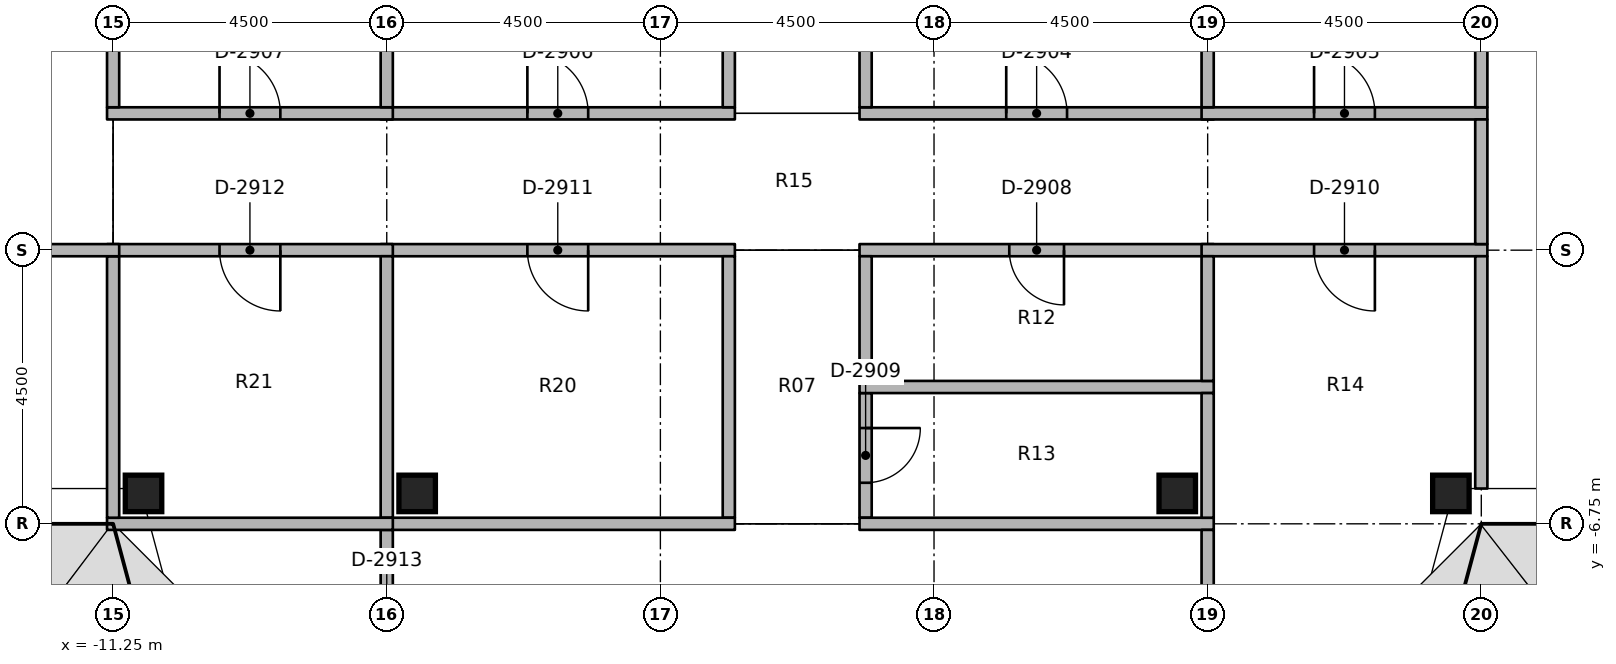
"""IFC4 building model, lengths in metres.
Left out: names, types, materials, properties, quantities, classifications, styles, units other than length and angle.
Written with IfcOpenShell. Run it as: python <this file> out.ifc"""

import sys

from ifc_helpers import new_model, si_unit, direction, frame, frame_2d, origin, origin_2d, place, context, subcontext, project, spatial, rectangle, extrude, element, fill, save


model = new_model("IFC4")
c1 = context("Model", 3, precision=1e-05, world=origin(), true_north=direction((0.0, 1.0)))
c2 = subcontext(c1, "Body", "Model", "MODEL_VIEW")
j1 = project(units=[si_unit("LENGTHUNIT", "METRE"), si_unit("PLANEANGLEUNIT", "RADIAN")], contexts=[c1])
p1 = place(None, origin())
s1 = spatial("IfcSite", under=j1, at=p1, CompositionType="ELEMENT")
p2 = place(p1, origin())
s2 = spatial("IfcBuilding", under=s1, at=p2, CompositionType="ELEMENT")
p3 = place(p2, frame((0.0, 0.0, 276.4)))
s3 = spatial("IfcBuildingStorey", under=s2, at=p3, CompositionType="ELEMENT", Elevation=276.4)
for number, where, z_axis, x_axis in (
    (1, (-10.75, -6.25, 0.0), (0.0, 0.0, 1.0), (1.0, 0.0, 0.0)),
    (2, (-6.25, -6.25, 0.0), (0.0, 0.0, 1.0), (1.0, 0.0, 0.0)),
    (3, (6.25, -6.25, 0.0), (0.0, 0.0, 1.0), (1.0, 0.0, 0.0)),
    (4, (10.75, -6.25, 0.0), (0.0, 0.0, 1.0), (1.0, 0.0, 0.0)),
):
    element("IfcColumn", number, at=place(p3, frame(where, z_axis=z_axis, x_axis=x_axis)), inside=s3, PredefinedType="COLUMN", context=c2, shape_type="SweptSolid", body=[
        extrude(rectangle(XDim=0.6, YDim=0.6, at=origin_2d()), origin(), (0.0, 0.0, 1.0), 3.65),
    ])
p4 = place(p3, frame((1.025, 0.0, 0.0), z_axis=(0.0, 0.0, 1.0), x_axis=(1.0, 0.0, 0.0)))
e5 = element("IfcWall", 5, at=p4, inside=s3, PredefinedType="PARTITIONING", context=c2, shape_type="SweptSolid", body=[
    extrude(rectangle(XDim=5.825, YDim=0.2, at=frame_2d((2.913, 0.0))), origin(), (0.0, 0.0, 1.0), 2.75),
])
p5 = place(p4, frame((2.413, 0.0, 0.0)))
e6 = element("IfcOpeningElement", 6, at=p5, cuts=e5, PredefinedType="OPENING", context=c2, shape_type="SweptSolid", body=[
    extrude(rectangle(XDim=1.0, YDim=2.1, at=frame_2d((0.5, 1.05))), frame((0.0, 0.11, 0.0), z_axis=(0.0, -1.0, 0.0), x_axis=(1.0, 0.0, 0.0)), (0.0, 0.0, 1.0), 0.22),
])
p6 = place(p3, frame((6.65, 0.0, 0.0), z_axis=(0.0, 0.0, 1.0), x_axis=(1.0, 0.0, 0.0)))
e7 = element("IfcWall", 7, at=p6, inside=s3, PredefinedType="PARTITIONING", context=c2, shape_type="SweptSolid", body=[
    extrude(rectangle(XDim=4.7, YDim=0.2, at=frame_2d((2.35, 0.0))), origin(), (0.0, 0.0, 1.0), 2.75),
])
p7 = place(p6, frame((1.85, 0.0, 0.0)))
e8 = element("IfcOpeningElement", 8, at=p7, cuts=e7, PredefinedType="OPENING", context=c2, shape_type="SweptSolid", body=[
    extrude(rectangle(XDim=1.0, YDim=2.1, at=frame_2d((0.5, 1.05))), frame((0.0, 0.11, 0.0), z_axis=(0.0, -1.0, 0.0), x_axis=(1.0, 0.0, 0.0)), (0.0, 0.0, 1.0), 0.22),
])
p8 = place(p3, frame((-6.85, 0.0, 0.0), z_axis=(0.0, 0.0, 1.0), x_axis=(1.0, 0.0, 0.0)))
e9 = element("IfcWall", 9, at=p8, inside=s3, PredefinedType="PARTITIONING", context=c2, shape_type="SweptSolid", body=[
    extrude(rectangle(XDim=5.825, YDim=0.2, at=frame_2d((2.913, 0.0))), origin(), (0.0, 0.0, 1.0), 2.75),
])
p9 = place(p8, frame((2.413, 0.0, 0.0)))
e10 = element("IfcOpeningElement", 10, at=p9, cuts=e9, PredefinedType="OPENING", context=c2, shape_type="SweptSolid", body=[
    extrude(rectangle(XDim=1.0, YDim=2.1, at=frame_2d((0.5, 1.05))), frame((0.0, 0.11, 0.0), z_axis=(0.0, -1.0, 0.0), x_axis=(1.0, 0.0, 0.0)), (0.0, 0.0, 1.0), 0.22),
])
p10 = place(p3, frame((-11.35, 0.0, 0.0), z_axis=(0.0, 0.0, 1.0), x_axis=(1.0, 0.0, 0.0)))
e11 = element("IfcWall", 11, at=p10, inside=s3, PredefinedType="PARTITIONING", context=c2, shape_type="SweptSolid", body=[
    extrude(rectangle(XDim=4.7, YDim=0.2, at=frame_2d((2.35, 0.0))), origin(), (0.0, 0.0, 1.0), 2.75),
])
p11 = place(p10, frame((1.85, 0.0, 0.0)))
e12 = element("IfcOpeningElement", 12, at=p11, cuts=e11, PredefinedType="OPENING", context=c2, shape_type="SweptSolid", body=[
    extrude(rectangle(XDim=1.0, YDim=2.1, at=frame_2d((0.5, 1.05))), frame((0.0, 0.11, 0.0), z_axis=(0.0, -1.0, 0.0), x_axis=(1.0, 0.0, 0.0)), (0.0, 0.0, 1.0), 0.22),
])
p12 = place(p3, frame((6.85, -2.25, 0.0), z_axis=(0.0, 0.0, 1.0), x_axis=(-1.0, 0.0, 0.0)))
e13 = element("IfcWall", 13, at=p12, inside=s3, PredefinedType="PARTITIONING", context=c2, shape_type="SweptSolid", body=[
    extrude(rectangle(XDim=5.825, YDim=0.2, at=frame_2d((2.913, 0.0))), origin(), (0.0, 0.0, 1.0), 2.75),
])
p13 = place(p12, frame((2.462, 0.0, 0.0)))
e14 = element("IfcOpeningElement", 14, at=p13, cuts=e13, PredefinedType="OPENING", context=c2, shape_type="SweptSolid", body=[
    extrude(rectangle(XDim=0.9, YDim=2.1, at=frame_2d((0.45, 1.05))), frame((0.0, 0.11, 0.0), z_axis=(0.0, -1.0, 0.0), x_axis=(1.0, 0.0, 0.0)), (0.0, 0.0, 1.0), 0.22),
])
p14 = place(p3, frame((11.35, -2.25, 0.0), z_axis=(0.0, 0.0, 1.0), x_axis=(-1.0, 0.0, 0.0)))
e15 = element("IfcWall", 15, at=p14, inside=s3, PredefinedType="PARTITIONING", context=c2, shape_type="SweptSolid", body=[
    extrude(rectangle(XDim=4.7, YDim=0.2, at=frame_2d((2.35, 0.0))), origin(), (0.0, 0.0, 1.0), 2.75),
])
p15 = place(p14, frame((1.85, 0.0, 0.0)))
e16 = element("IfcOpeningElement", 16, at=p15, cuts=e15, PredefinedType="OPENING", context=c2, shape_type="SweptSolid", body=[
    extrude(rectangle(XDim=1.0, YDim=2.1, at=frame_2d((0.5, 1.05))), frame((0.0, 0.11, 0.0), z_axis=(0.0, -1.0, 0.0), x_axis=(1.0, 0.0, 0.0)), (0.0, 0.0, 1.0), 0.22),
])
p16 = place(p3, frame((-1.025, -2.25, 0.0), z_axis=(0.0, 0.0, 1.0), x_axis=(-1.0, 0.0, 0.0)))
e17 = element("IfcWall", 17, at=p16, inside=s3, PredefinedType="PARTITIONING", context=c2, shape_type="SweptSolid", body=[
    extrude(rectangle(XDim=5.825, YDim=0.2, at=frame_2d((2.913, 0.0))), origin(), (0.0, 0.0, 1.0), 2.75),
])
p17 = place(p16, frame((2.413, 0.0, 0.0)))
e18 = element("IfcOpeningElement", 18, at=p17, cuts=e17, PredefinedType="OPENING", context=c2, shape_type="SweptSolid", body=[
    extrude(rectangle(XDim=1.0, YDim=2.1, at=frame_2d((0.5, 1.05))), frame((0.0, 0.11, 0.0), z_axis=(0.0, -1.0, 0.0), x_axis=(1.0, 0.0, 0.0)), (0.0, 0.0, 1.0), 0.22),
])
p18 = place(p3, frame((-6.65, -2.25, 0.0), z_axis=(0.0, 0.0, 1.0), x_axis=(-1.0, 0.0, 0.0)))
e19 = element("IfcWall", 19, at=p18, inside=s3, PredefinedType="PARTITIONING", context=c2, shape_type="SweptSolid", body=[
    extrude(rectangle(XDim=4.7, YDim=0.2, at=frame_2d((2.35, 0.0))), origin(), (0.0, 0.0, 1.0), 2.75),
])
p19 = place(p18, frame((1.85, 0.0, 0.0)))
e20 = element("IfcOpeningElement", 20, at=p19, cuts=e19, PredefinedType="OPENING", context=c2, shape_type="SweptSolid", body=[
    extrude(rectangle(XDim=1.0, YDim=2.1, at=frame_2d((0.5, 1.05))), frame((0.0, 0.11, 0.0), z_axis=(0.0, -1.0, 0.0), x_axis=(1.0, 0.0, 0.0)), (0.0, 0.0, 1.0), 0.22),
])
p20 = place(p3, frame((11.25, -2.15, 0.0), z_axis=(0.0, 0.0, 1.0), x_axis=(0.0, 1.0, 0.0)))
e21 = element("IfcWall", 21, at=p20, inside=s3, PredefinedType="PARTITIONING", context=c2, shape_type="SweptSolid", body=[
    extrude(rectangle(XDim=2.05, YDim=0.2, at=frame_2d((1.025, 0.0))), origin(), (0.0, 0.0, 1.0), 2.75),
])
for number, where, z_axis, x_axis in (
    (22, (1.125, 0.1, 0.0), (0.0, 0.0, 1.0), (0.0, 1.0, 0.0)),
    (23, (-1.125, 0.1, 0.0), (0.0, 0.0, 1.0), (0.0, 1.0, 0.0)),
):
    element("IfcWall", number, at=place(p3, frame(where, z_axis=z_axis, x_axis=x_axis)), inside=s3, PredefinedType="PARTITIONING", context=c2, shape_type="SweptSolid", body=[
        extrude(rectangle(XDim=6.55, YDim=0.2, at=frame_2d((3.275, 0.0))), origin(), (0.0, 0.0, 1.0), 2.75),
    ])
p21 = place(p3, frame((1.125, -4.4, 0.0), z_axis=(0.0, 0.0, 1.0), x_axis=(0.0, 1.0, 0.0)))
e24 = element("IfcWall", 24, at=p21, inside=s3, PredefinedType="PARTITIONING", context=c2, shape_type="SweptSolid", body=[
    extrude(rectangle(XDim=2.05, YDim=0.2, at=frame_2d((1.025, 0.0))), origin(), (0.0, 0.0, 1.0), 2.75),
])
p22 = place(p3, frame((1.125, -4.6, 0.0), z_axis=(0.0, 0.0, 1.0), x_axis=(0.0, -1.0, 0.0)))
e25 = element("IfcWall", 25, at=p22, inside=s3, PredefinedType="PARTITIONING", context=c2, shape_type="SweptSolid", body=[
    extrude(rectangle(XDim=2.05, YDim=0.2, at=frame_2d((1.025, 0.0))), origin(), (0.0, 0.0, 1.0), 2.75),
])
p23 = place(p22, frame((0.575, 0.0, 0.0)))
e26 = element("IfcOpeningElement", 26, at=p23, cuts=e25, PredefinedType="OPENING", context=c2, shape_type="SweptSolid", body=[
    extrude(rectangle(XDim=0.9, YDim=2.1, at=frame_2d((0.45, 1.05))), frame((0.0, 0.11, 0.0), z_axis=(0.0, -1.0, 0.0), x_axis=(1.0, 0.0, 0.0)), (0.0, 0.0, 1.0), 0.22),
])
p24 = place(p3, frame((-1.125, -6.65, 0.0), z_axis=(0.0, 0.0, 1.0), x_axis=(0.0, 1.0, 0.0)))
e27 = element("IfcWall", 27, at=p24, inside=s3, PredefinedType="PARTITIONING", context=c2, shape_type="SweptSolid", body=[
    extrude(rectangle(XDim=4.3, YDim=0.2, at=frame_2d((2.15, 0.0))), origin(), (0.0, 0.0, 1.0), 2.75),
])
p25 = place(p3, frame((1.025, -6.75, 0.0), z_axis=(0.0, 0.0, 1.0), x_axis=(1.0, 0.0, 0.0)))
e28 = element("IfcWall", 28, at=p25, inside=s3, PredefinedType="PARTITIONING", context=c2, shape_type="SweptSolid", body=[
    extrude(rectangle(XDim=5.825, YDim=0.2, at=frame_2d((2.913, 0.0))), origin(), (0.0, 0.0, 1.0), 2.75),
])
p26 = place(p3, frame((6.75, -10.63, 0.0), z_axis=(0.0, 0.0, 1.0), x_axis=(0.0, 1.0, 0.0)))
e29 = element("IfcWall", 29, at=p26, inside=s3, PredefinedType="PARTITIONING", context=c2, shape_type="SweptSolid", body=[
    extrude(rectangle(XDim=3.78, YDim=0.2, at=frame_2d((1.89, 0.0))), origin(), (0.0, 0.0, 1.0), 2.75),
])
p27 = place(p3, frame((-6.85, -6.75, 0.0), z_axis=(0.0, 0.0, 1.0), x_axis=(1.0, 0.0, 0.0)))
e30 = element("IfcWall", 30, at=p27, inside=s3, PredefinedType="PARTITIONING", context=c2, shape_type="SweptSolid", body=[
    extrude(rectangle(XDim=5.825, YDim=0.2, at=frame_2d((2.913, 0.0))), origin(), (0.0, 0.0, 1.0), 2.75),
])
p28 = place(p3, frame((-6.75, -10.63, 0.0), z_axis=(0.0, 0.0, 1.0), x_axis=(0.0, 1.0, 0.0)))
e31 = element("IfcWall", 31, at=p28, inside=s3, PredefinedType="PARTITIONING", context=c2, shape_type="SweptSolid", body=[
    extrude(rectangle(XDim=3.78, YDim=0.2, at=frame_2d((1.89, 0.0))), origin(), (0.0, 0.0, 1.0), 2.75),
])
p29 = place(p28, frame((1.44, 0.0, 0.0)))
e32 = element("IfcOpeningElement", 32, at=p29, cuts=e31, PredefinedType="OPENING", context=c2, shape_type="SweptSolid", body=[
    extrude(rectangle(XDim=0.9, YDim=2.1, at=frame_2d((0.45, 1.05))), frame((0.0, 0.11, 0.0), z_axis=(0.0, -1.0, 0.0), x_axis=(1.0, 0.0, 0.0)), (0.0, 0.0, 1.0), 0.22),
])
p30 = place(p3, frame((6.75, 0.1, 0.0), z_axis=(0.0, 0.0, 1.0), x_axis=(0.0, 1.0, 0.0)))
e33 = element("IfcWall", 33, at=p30, inside=s3, PredefinedType="PARTITIONING", context=c2, shape_type="SweptSolid", body=[
    extrude(rectangle(XDim=6.55, YDim=0.2, at=frame_2d((3.275, 0.0))), origin(), (0.0, 0.0, 1.0), 2.75),
])
p31 = place(p3, frame((11.25, 6.17, 0.0), z_axis=(0.0, 0.0, 1.0), x_axis=(0.0, -1.0, 0.0)))
e34 = element("IfcWall", 34, at=p31, inside=s3, PredefinedType="PARTITIONING", context=c2, shape_type="SweptSolid", body=[
    extrude(rectangle(XDim=6.07, YDim=0.2, at=frame_2d((3.035, 0.0))), origin(), (0.0, 0.0, 1.0), 2.75),
])
p32 = place(p31, frame((2.135, 0.0, 0.0)))
e35 = element("IfcOpeningElement", 35, at=p32, cuts=e34, PredefinedType="OPENING", context=c2, shape_type="SweptSolid", body=[
    extrude(rectangle(XDim=1.8, YDim=2.1, at=frame_2d((0.9, 1.05))), frame((0.0, 0.11, 0.0), z_axis=(0.0, -1.0, 0.0), x_axis=(1.0, 0.0, 0.0)), (0.0, 0.0, 1.0), 0.22),
])
p33 = place(p3, frame((-6.75, 0.1, 0.0), z_axis=(0.0, 0.0, 1.0), x_axis=(0.0, 1.0, 0.0)))
e36 = element("IfcWall", 36, at=p33, inside=s3, PredefinedType="PARTITIONING", context=c2, shape_type="SweptSolid", body=[
    extrude(rectangle(XDim=6.55, YDim=0.2, at=frame_2d((3.275, 0.0))), origin(), (0.0, 0.0, 1.0), 2.75),
])
p34 = place(p3, frame((-11.25, 0.1, 0.0), z_axis=(0.0, 0.0, 1.0), x_axis=(0.0, 1.0, 0.0)))
e37 = element("IfcWall", 37, at=p34, inside=s3, PredefinedType="PARTITIONING", context=c2, shape_type="SweptSolid", body=[
    extrude(rectangle(XDim=2.05, YDim=0.2, at=frame_2d((1.025, 0.0))), origin(), (0.0, 0.0, 1.0), 2.75),
])
p35 = place(p3, frame((1.025, -4.5, 0.0), z_axis=(0.0, 0.0, 1.0), x_axis=(1.0, 0.0, 0.0)))
e38 = element("IfcWall", 38, at=p35, inside=s3, PredefinedType="PARTITIONING", context=c2, shape_type="SweptSolid", body=[
    extrude(rectangle(XDim=5.825, YDim=0.2, at=frame_2d((2.913, 0.0))), origin(), (0.0, 0.0, 1.0), 2.75),
])
for number, where, z_axis, x_axis in (
    (39, (6.75, -4.4, 0.0), (0.0, 0.0, 1.0), (0.0, 1.0, 0.0)),
    (40, (6.75, -6.65, 0.0), (0.0, 0.0, 1.0), (0.0, 1.0, 0.0)),
):
    element("IfcWall", number, at=place(p3, frame(where, z_axis=z_axis, x_axis=x_axis)), inside=s3, PredefinedType="PARTITIONING", context=c2, shape_type="SweptSolid", body=[
        extrude(rectangle(XDim=2.05, YDim=0.2, at=frame_2d((1.025, 0.0))), origin(), (0.0, 0.0, 1.0), 2.75),
    ])
p36 = place(p3, frame((11.25, -6.17, 0.0), z_axis=(0.0, 0.0, 1.0), x_axis=(0.0, 1.0, 0.0)))
e41 = element("IfcWall", 41, at=p36, inside=s3, PredefinedType="PARTITIONING", context=c2, shape_type="SweptSolid", body=[
    extrude(rectangle(XDim=3.82, YDim=0.2, at=frame_2d((1.91, 0.0))), origin(), (0.0, 0.0, 1.0), 2.75),
])
p37 = place(p3, frame((-6.75, -6.65, 0.0), z_axis=(0.0, 0.0, 1.0), x_axis=(0.0, 1.0, 0.0)))
e42 = element("IfcWall", 42, at=p37, inside=s3, PredefinedType="PARTITIONING", context=c2, shape_type="SweptSolid", body=[
    extrude(rectangle(XDim=4.3, YDim=0.2, at=frame_2d((2.15, 0.0))), origin(), (0.0, 0.0, 1.0), 2.75),
])
p38 = place(p3, frame((-11.35, -6.75, 0.0), z_axis=(0.0, 0.0, 1.0), x_axis=(1.0, 0.0, 0.0)))
e43 = element("IfcWall", 43, at=p38, inside=s3, PredefinedType="PARTITIONING", context=c2, shape_type="SweptSolid", body=[
    extrude(rectangle(XDim=4.7, YDim=0.2, at=frame_2d((2.35, 0.0))), origin(), (0.0, 0.0, 1.0), 2.75),
])
p39 = place(p3, frame((-11.25, -6.65, 0.0), z_axis=(0.0, 0.0, 1.0), x_axis=(0.0, 1.0, 0.0)))
e44 = element("IfcWall", 44, at=p39, inside=s3, PredefinedType="PARTITIONING", context=c2, shape_type="SweptSolid", body=[
    extrude(rectangle(XDim=4.3, YDim=0.2, at=frame_2d((2.15, 0.0))), origin(), (0.0, 0.0, 1.0), 2.75),
])
p40 = place(p3, frame((-11.15, -2.25, 0.0), z_axis=(0.0, 0.0, 1.0), x_axis=(-1.0, 0.0, 0.0)))
e45 = element("IfcWall", 45, at=p40, inside=s3, PredefinedType="PARTITIONING", context=c2, shape_type="SweptSolid", body=[
    extrude(rectangle(XDim=4.7, YDim=0.2, at=frame_2d((2.35, 0.0))), origin(), (0.0, 0.0, 1.0), 2.75),
])
p41 = place(p40, frame((1.85, 0.0, 0.0)))
e46 = element("IfcOpeningElement", 46, at=p41, cuts=e45, PredefinedType="OPENING", context=c2, shape_type="SweptSolid", body=[
    extrude(rectangle(XDim=1.0, YDim=2.1, at=frame_2d((0.5, 1.05))), frame((0.0, 0.11, 0.0), z_axis=(0.0, -1.0, 0.0), x_axis=(1.0, 0.0, 0.0)), (0.0, 0.0, 1.0), 0.22),
])
p42 = place(p5, origin())
e47 = element("IfcDoor", 47, at=p42, inside=s3, OperationType="SINGLE_SWING_RIGHT", PredefinedType="DOOR", context=c2, shape_type="SweptSolid", body=[
    extrude(rectangle(XDim=1.0, YDim=2.1, at=frame_2d((0.5, 1.05))), frame((0.0, 0.025, 0.0), z_axis=(0.0, -1.0, 0.0), x_axis=(1.0, 0.0, 0.0)), (0.0, 0.0, 1.0), 0.05),
])
fill(e6, e47)
p43 = place(p7, origin())
e48 = element("IfcDoor", 48, at=p43, inside=s3, OperationType="SINGLE_SWING_RIGHT", PredefinedType="DOOR", context=c2, shape_type="SweptSolid", body=[
    extrude(rectangle(XDim=1.0, YDim=2.1, at=frame_2d((0.5, 1.05))), frame((0.0, 0.025, 0.0), z_axis=(0.0, -1.0, 0.0), x_axis=(1.0, 0.0, 0.0)), (0.0, 0.0, 1.0), 0.05),
])
fill(e8, e48)
p44 = place(p9, origin())
e49 = element("IfcDoor", 49, at=p44, inside=s3, OperationType="SINGLE_SWING_RIGHT", PredefinedType="DOOR", context=c2, shape_type="SweptSolid", body=[
    extrude(rectangle(XDim=1.0, YDim=2.1, at=frame_2d((0.5, 1.05))), frame((0.0, 0.025, 0.0), z_axis=(0.0, -1.0, 0.0), x_axis=(1.0, 0.0, 0.0)), (0.0, 0.0, 1.0), 0.05),
])
fill(e10, e49)
p45 = place(p11, origin())
e50 = element("IfcDoor", 50, at=p45, inside=s3, OperationType="SINGLE_SWING_RIGHT", PredefinedType="DOOR", context=c2, shape_type="SweptSolid", body=[
    extrude(rectangle(XDim=1.0, YDim=2.1, at=frame_2d((0.5, 1.05))), frame((0.0, 0.025, 0.0), z_axis=(0.0, -1.0, 0.0), x_axis=(1.0, 0.0, 0.0)), (0.0, 0.0, 1.0), 0.05),
])
fill(e12, e50)
p46 = place(p13, origin())
e51 = element("IfcDoor", 51, at=p46, inside=s3, OperationType="SINGLE_SWING_RIGHT", PredefinedType="DOOR", context=c2, shape_type="SweptSolid", body=[
    extrude(rectangle(XDim=0.9, YDim=2.1, at=frame_2d((0.45, 1.05))), frame((0.0, 0.025, 0.0), z_axis=(0.0, -1.0, 0.0), x_axis=(1.0, 0.0, 0.0)), (0.0, 0.0, 1.0), 0.05),
])
fill(e14, e51)
p47 = place(p23, origin())
e52 = element("IfcDoor", 52, at=p47, inside=s3, OperationType="SINGLE_SWING_RIGHT", PredefinedType="DOOR", context=c2, shape_type="SweptSolid", body=[
    extrude(rectangle(XDim=0.9, YDim=2.1, at=frame_2d((0.45, 1.05))), frame((0.0, 0.025, 0.0), z_axis=(0.0, -1.0, 0.0), x_axis=(1.0, 0.0, 0.0)), (0.0, 0.0, 1.0), 0.05),
])
fill(e26, e52)
p48 = place(p15, origin())
e53 = element("IfcDoor", 53, at=p48, inside=s3, OperationType="SINGLE_SWING_RIGHT", PredefinedType="DOOR", context=c2, shape_type="SweptSolid", body=[
    extrude(rectangle(XDim=1.0, YDim=2.1, at=frame_2d((0.5, 1.05))), frame((0.0, 0.025, 0.0), z_axis=(0.0, -1.0, 0.0), x_axis=(1.0, 0.0, 0.0)), (0.0, 0.0, 1.0), 0.05),
])
fill(e16, e53)
p49 = place(p17, origin())
e54 = element("IfcDoor", 54, at=p49, inside=s3, OperationType="SINGLE_SWING_RIGHT", PredefinedType="DOOR", context=c2, shape_type="SweptSolid", body=[
    extrude(rectangle(XDim=1.0, YDim=2.1, at=frame_2d((0.5, 1.05))), frame((0.0, 0.025, 0.0), z_axis=(0.0, -1.0, 0.0), x_axis=(1.0, 0.0, 0.0)), (0.0, 0.0, 1.0), 0.05),
])
fill(e18, e54)
p50 = place(p19, origin())
e55 = element("IfcDoor", 55, at=p50, inside=s3, OperationType="SINGLE_SWING_RIGHT", PredefinedType="DOOR", context=c2, shape_type="SweptSolid", body=[
    extrude(rectangle(XDim=1.0, YDim=2.1, at=frame_2d((0.5, 1.05))), frame((0.0, 0.025, 0.0), z_axis=(0.0, -1.0, 0.0), x_axis=(1.0, 0.0, 0.0)), (0.0, 0.0, 1.0), 0.05),
])
fill(e20, e55)
save(model, sys.argv[1])
